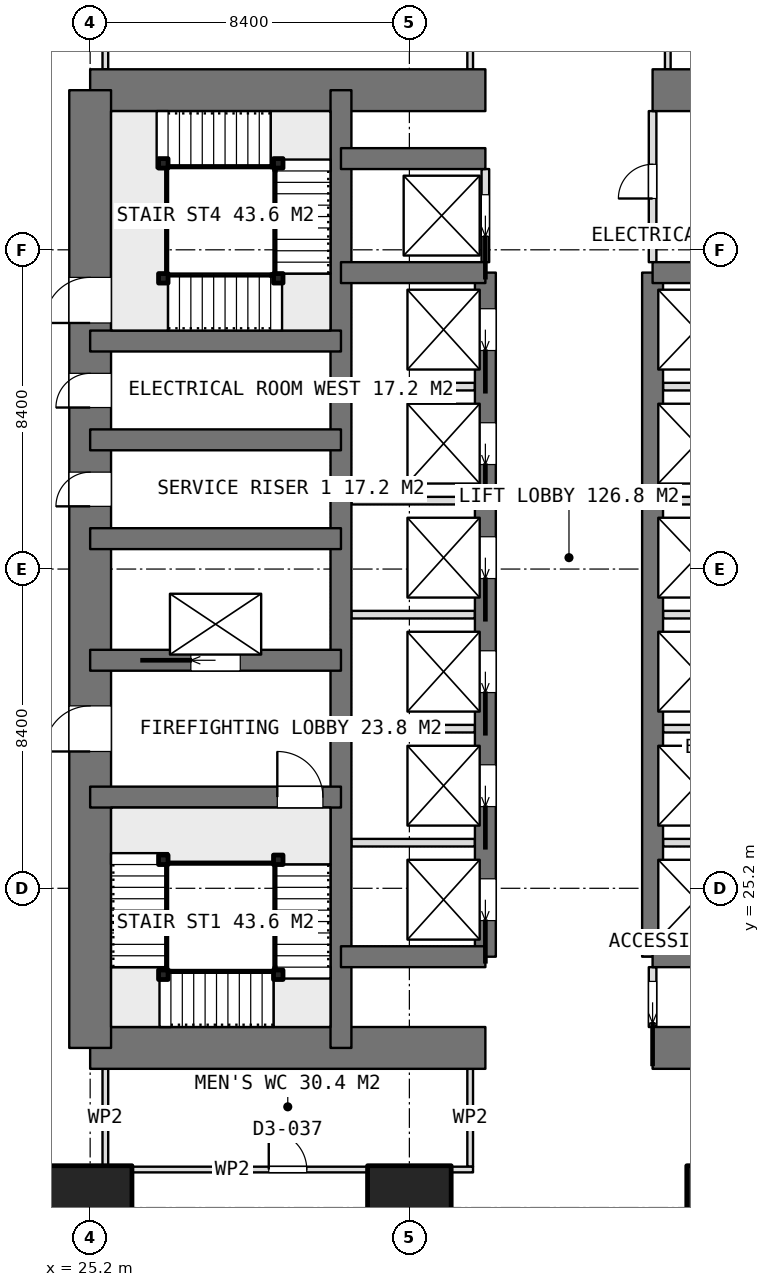
"""IFC4 building model, lengths in metres.
Left out: names, types, materials, properties, quantities, classifications, styles, units other than length and angle.
Written with IfcOpenShell. Run it as: python <this file> out.ifc"""

import sys

from ifc_helpers import new_model, si_unit, direction, frame, frame_2d, origin, origin_2d, place, context, subcontext, project, spatial, rectangle, extrude, element, fill, save


model = new_model("IFC4")
c1 = context("Model", 3, precision=1e-05, world=origin(), true_north=direction((0.0, 1.0)))
c2 = subcontext(c1, "Body", "Model", "MODEL_VIEW")
j1 = project(units=[si_unit("LENGTHUNIT", "METRE"), si_unit("PLANEANGLEUNIT", "RADIAN")], contexts=[c1])
p1 = place(None, origin())
s1 = spatial("IfcSite", under=j1, at=p1, CompositionType="ELEMENT")
p2 = place(p1, origin())
s2 = spatial("IfcBuilding", under=s1, at=p2, CompositionType="ELEMENT")
p3 = place(p2, frame((0.0, 0.0, 32.9)))
s3 = spatial("IfcBuildingStorey", under=s2, at=p3, CompositionType="ELEMENT", Elevation=32.9)
p4 = place(p3, frame((25.2, 21.0, 0.0), z_axis=(0.0, 0.0, 1.0), x_axis=(1.0, 0.0, 0.0)))
e1 = element("IfcWall", 1, at=p4, inside=s3, PredefinedType="SHEAR", context=c2, shape_type="SweptSolid", body=[
    extrude(rectangle(XDim=10.4, YDim=1.1, at=frame_2d((5.2, 0.0))), origin(), (0.0, 0.0, 1.0), 3.75),
])
p5 = place(p3, frame((40.0, 21.0, 0.0), z_axis=(0.0, 0.0, 1.0), x_axis=(1.0, 0.0, 0.0)))
e2 = element("IfcWall", 2, at=p5, inside=s3, PredefinedType="SHEAR", context=c2, shape_type="SweptSolid", body=[
    extrude(rectangle(XDim=10.4, YDim=1.1, at=frame_2d((5.2, 0.0))), origin(), (0.0, 0.0, 1.0), 3.75),
])
p6 = place(p3, frame((25.2, 46.2, 0.0), z_axis=(0.0, 0.0, 1.0), x_axis=(1.0, 0.0, 0.0)))
e3 = element("IfcWall", 3, at=p6, inside=s3, PredefinedType="SHEAR", context=c2, shape_type="SweptSolid", body=[
    extrude(rectangle(XDim=10.4, YDim=1.1, at=frame_2d((5.2, 0.0))), origin(), (0.0, 0.0, 1.0), 3.75),
])
p7 = place(p3, frame((40.0, 46.2, 0.0), z_axis=(0.0, 0.0, 1.0), x_axis=(1.0, 0.0, 0.0)))
e4 = element("IfcWall", 4, at=p7, inside=s3, PredefinedType="SHEAR", context=c2, shape_type="SweptSolid", body=[
    extrude(rectangle(XDim=10.4, YDim=1.1, at=frame_2d((5.2, 0.0))), origin(), (0.0, 0.0, 1.0), 3.75),
])
p8 = place(p3, frame((25.2, 21.0, 0.0), z_axis=(0.0, 0.0, 1.0), x_axis=(0.0, 1.0, 0.0)))
e5 = element("IfcWall", 5, at=p8, inside=s3, PredefinedType="SHEAR", context=c2, shape_type="SweptSolid", body=[
    extrude(rectangle(XDim=25.2, YDim=1.1, at=frame_2d((12.6, 0.0))), origin(), (0.0, 0.0, 1.0), 3.75),
])
p9 = place(p8, frame((7.8, 0.0, 0.0)))
e6 = element("IfcOpeningElement", 6, at=p9, cuts=e5, PredefinedType="OPENING", context=c2, shape_type="SweptSolid", body=[
    extrude(rectangle(XDim=1.2, YDim=2.1, at=frame_2d((0.6, 1.05))), frame((0.0, 0.56, 0.0), z_axis=(0.0, -1.0, 0.0), x_axis=(1.0, 0.0, 0.0)), (0.0, 0.0, 1.0), 1.12),
])
p10 = place(p8, frame((14.25, 0.0, 0.0)))
e7 = element("IfcOpeningElement", 7, at=p10, cuts=e5, PredefinedType="OPENING", context=c2, shape_type="SweptSolid", body=[
    extrude(rectangle(XDim=0.9, YDim=2.1, at=frame_2d((0.45, 1.05))), frame((0.0, 0.56, 0.0), z_axis=(0.0, -1.0, 0.0), x_axis=(1.0, 0.0, 0.0)), (0.0, 0.0, 1.0), 1.12),
])
p11 = place(p8, frame((16.85, 0.0, 0.0)))
e8 = element("IfcOpeningElement", 8, at=p11, cuts=e5, PredefinedType="OPENING", context=c2, shape_type="SweptSolid", body=[
    extrude(rectangle(XDim=0.9, YDim=2.1, at=frame_2d((0.45, 1.05))), frame((0.0, 0.56, 0.0), z_axis=(0.0, -1.0, 0.0), x_axis=(1.0, 0.0, 0.0)), (0.0, 0.0, 1.0), 1.12),
])
p12 = place(p8, frame((19.075, 0.0, 0.0)))
e9 = element("IfcOpeningElement", 9, at=p12, cuts=e5, PredefinedType="OPENING", context=c2, shape_type="SweptSolid", body=[
    extrude(rectangle(XDim=1.2, YDim=2.1, at=frame_2d((0.6, 1.05))), frame((0.0, 0.56, 0.0), z_axis=(0.0, -1.0, 0.0), x_axis=(1.0, 0.0, 0.0)), (0.0, 0.0, 1.0), 1.12),
])
p13 = place(p3, frame((31.8, 21.0, 0.0), z_axis=(0.0, 0.0, 1.0), x_axis=(0.0, 1.0, 0.0)))
e10 = element("IfcWall", 10, at=p13, inside=s3, PredefinedType="SHEAR", context=c2, shape_type="SweptSolid", body=[
    extrude(rectangle(XDim=25.2, YDim=0.55, at=frame_2d((12.6, 0.0))), origin(), (0.0, 0.0, 1.0), 3.75),
])
p14 = place(p3, frame((35.6, 23.4, 0.0), z_axis=(0.0, 0.0, 1.0), x_axis=(0.0, 1.0, 0.0)))
e11 = element("IfcWall", 11, at=p14, inside=s3, PredefinedType="SHEAR", context=c2, shape_type="SweptSolid", body=[
    extrude(rectangle(XDim=18.0, YDim=0.55, at=frame_2d((9.0, 0.0))), origin(), (0.0, 0.0, 1.0), 3.75),
])
p15 = place(p14, frame((0.95, 0.0, 0.0)))
e12 = element("IfcOpeningElement", 12, at=p15, cuts=e11, PredefinedType="OPENING", context=c2, shape_type="SweptSolid", body=[
    extrude(rectangle(XDim=1.1, YDim=2.1, at=frame_2d((0.55, 1.05))), frame((0.0, 0.285, 0.0), z_axis=(0.0, -1.0, 0.0), x_axis=(1.0, 0.0, 0.0)), (0.0, 0.0, 1.0), 0.57),
])
p16 = place(p14, frame((3.95, 0.0, 0.0)))
e13 = element("IfcOpeningElement", 13, at=p16, cuts=e11, PredefinedType="OPENING", context=c2, shape_type="SweptSolid", body=[
    extrude(rectangle(XDim=1.1, YDim=2.1, at=frame_2d((0.55, 1.05))), frame((0.0, 0.285, 0.0), z_axis=(0.0, -1.0, 0.0), x_axis=(1.0, 0.0, 0.0)), (0.0, 0.0, 1.0), 0.57),
])
p17 = place(p14, frame((6.95, 0.0, 0.0)))
e14 = element("IfcOpeningElement", 14, at=p17, cuts=e11, PredefinedType="OPENING", context=c2, shape_type="SweptSolid", body=[
    extrude(rectangle(XDim=1.1, YDim=2.1, at=frame_2d((0.55, 1.05))), frame((0.0, 0.285, 0.0), z_axis=(0.0, -1.0, 0.0), x_axis=(1.0, 0.0, 0.0)), (0.0, 0.0, 1.0), 0.57),
])
p18 = place(p14, frame((9.95, 0.0, 0.0)))
e15 = element("IfcOpeningElement", 15, at=p18, cuts=e11, PredefinedType="OPENING", context=c2, shape_type="SweptSolid", body=[
    extrude(rectangle(XDim=1.1, YDim=2.1, at=frame_2d((0.55, 1.05))), frame((0.0, 0.285, 0.0), z_axis=(0.0, -1.0, 0.0), x_axis=(1.0, 0.0, 0.0)), (0.0, 0.0, 1.0), 0.57),
])
p19 = place(p14, frame((12.95, 0.0, 0.0)))
e16 = element("IfcOpeningElement", 16, at=p19, cuts=e11, PredefinedType="OPENING", context=c2, shape_type="SweptSolid", body=[
    extrude(rectangle(XDim=1.1, YDim=2.1, at=frame_2d((0.55, 1.05))), frame((0.0, 0.285, 0.0), z_axis=(0.0, -1.0, 0.0), x_axis=(1.0, 0.0, 0.0)), (0.0, 0.0, 1.0), 0.57),
])
p20 = place(p14, frame((15.95, 0.0, 0.0)))
e17 = element("IfcOpeningElement", 17, at=p20, cuts=e11, PredefinedType="OPENING", context=c2, shape_type="SweptSolid", body=[
    extrude(rectangle(XDim=1.1, YDim=2.1, at=frame_2d((0.55, 1.05))), frame((0.0, 0.285, 0.0), z_axis=(0.0, -1.0, 0.0), x_axis=(1.0, 0.0, 0.0)), (0.0, 0.0, 1.0), 0.57),
])
p21 = place(p3, frame((40.0, 23.4, 0.0), z_axis=(0.0, 0.0, 1.0), x_axis=(0.0, 1.0, 0.0)))
e18 = element("IfcWall", 18, at=p21, inside=s3, PredefinedType="SHEAR", context=c2, shape_type="SweptSolid", body=[
    extrude(rectangle(XDim=18.0, YDim=0.55, at=frame_2d((9.0, 0.0))), origin(), (0.0, 0.0, 1.0), 3.75),
])
for number, where, z_axis, x_axis in (
    (19, (31.8, 23.4, 0.0), (0.0, 0.0, 1.0), (1.0, 0.0, 0.0)),
    (20, (31.8, 41.4, 0.0), (0.0, 0.0, 1.0), (1.0, 0.0, 0.0)),
    (21, (31.8, 44.4, 0.0), (0.0, 0.0, 1.0), (1.0, 0.0, 0.0)),
    (22, (40.0, 23.4, 0.0), (0.0, 0.0, 1.0), (1.0, 0.0, 0.0)),
    (23, (40.0, 41.4, 0.0), (0.0, 0.0, 1.0), (1.0, 0.0, 0.0)),
):
    element("IfcWall", number, at=place(p3, frame(where, z_axis=z_axis, x_axis=x_axis)), inside=s3, PredefinedType="SHEAR", context=c2, shape_type="SweptSolid", body=[
        extrude(rectangle(XDim=3.8, YDim=0.55, at=frame_2d((1.9, 0.0))), origin(), (0.0, 0.0, 1.0), 3.75),
    ])
p22 = place(p3, frame((25.2, 27.6, 0.0), z_axis=(0.0, 0.0, 1.0), x_axis=(1.0, 0.0, 0.0)))
e24 = element("IfcWall", 24, at=p22, inside=s3, PredefinedType="SHEAR", context=c2, shape_type="SweptSolid", body=[
    extrude(rectangle(XDim=6.6, YDim=0.55, at=frame_2d((3.3, 0.0))), origin(), (0.0, 0.0, 1.0), 3.75),
])
p23 = place(p22, frame((4.925, 0.0, 0.0)))
e25 = element("IfcOpeningElement", 25, at=p23, cuts=e24, PredefinedType="OPENING", context=c2, shape_type="SweptSolid", body=[
    extrude(rectangle(XDim=1.2, YDim=2.1, at=frame_2d((0.6, 1.05))), frame((0.0, 0.285, 0.0), z_axis=(0.0, -1.0, 0.0), x_axis=(1.0, 0.0, 0.0)), (0.0, 0.0, 1.0), 0.57),
])
p24 = place(p3, frame((25.2, 31.2, 0.0), z_axis=(0.0, 0.0, 1.0), x_axis=(1.0, 0.0, 0.0)))
e26 = element("IfcWall", 26, at=p24, inside=s3, PredefinedType="SHEAR", context=c2, shape_type="SweptSolid", body=[
    extrude(rectangle(XDim=6.6, YDim=0.55, at=frame_2d((3.3, 0.0))), origin(), (0.0, 0.0, 1.0), 3.75),
])
p25 = place(p24, frame((2.65, 0.0, 0.0)))
e27 = element("IfcOpeningElement", 27, at=p25, cuts=e26, PredefinedType="OPENING", context=c2, shape_type="SweptSolid", body=[
    extrude(rectangle(XDim=1.3, YDim=2.1, at=frame_2d((0.65, 1.05))), frame((0.0, 0.285, 0.0), z_axis=(0.0, -1.0, 0.0), x_axis=(1.0, 0.0, 0.0)), (0.0, 0.0, 1.0), 0.57),
])
for number, where, z_axis, x_axis in (
    (28, (25.2, 34.4, 0.0), (0.0, 0.0, 1.0), (1.0, 0.0, 0.0)),
    (29, (25.2, 37.0, 0.0), (0.0, 0.0, 1.0), (1.0, 0.0, 0.0)),
    (30, (25.2, 39.6, 0.0), (0.0, 0.0, 1.0), (1.0, 0.0, 0.0)),
):
    element("IfcWall", number, at=place(p3, frame(where, z_axis=z_axis, x_axis=x_axis)), inside=s3, PredefinedType="SHEAR", context=c2, shape_type="SweptSolid", body=[
        extrude(rectangle(XDim=6.6, YDim=0.55, at=frame_2d((3.3, 0.0))), origin(), (0.0, 0.0, 1.0), 3.75),
    ])
for number, where, z_axis, x_axis in (
    (31, (25.2, 16.8, 0.0), (0.0, 0.0, 1.0), (1.0, 0.0, 0.0)),
    (32, (33.6, 16.8, 0.0), (0.0, 0.0, 1.0), (1.0, 0.0, 0.0)),
    (33, (42.0, 16.8, 0.0), (0.0, 0.0, 1.0), (1.0, 0.0, 0.0)),
):
    element("IfcColumn", number, at=place(p3, frame(where, z_axis=z_axis, x_axis=x_axis)), inside=s3, PredefinedType="COLUMN", context=c2, shape_type="SweptSolid", body=[
        extrude(rectangle(XDim=2.2, YDim=2.2, at=origin_2d()), origin(), (0.0, 0.0, 1.0), 3.75),
    ])
for number, where, z_axis, x_axis in (
    (34, (32.075, 26.4, 0.0), (0.0, 0.0, 1.0), (1.0, 0.0, 0.0)),
    (35, (32.075, 29.4, 0.0), (0.0, 0.0, 1.0), (1.0, 0.0, 0.0)),
    (36, (32.075, 32.4, 0.0), (0.0, 0.0, 1.0), (1.0, 0.0, 0.0)),
    (37, (32.075, 35.4, 0.0), (0.0, 0.0, 1.0), (1.0, 0.0, 0.0)),
    (38, (32.075, 38.4, 0.0), (0.0, 0.0, 1.0), (1.0, 0.0, 0.0)),
    (39, (40.275, 26.4, 0.0), (0.0, 0.0, 1.0), (1.0, 0.0, 0.0)),
    (40, (40.275, 29.4, 0.0), (0.0, 0.0, 1.0), (1.0, 0.0, 0.0)),
    (41, (40.275, 32.4, 0.0), (0.0, 0.0, 1.0), (1.0, 0.0, 0.0)),
    (42, (40.275, 35.4, 0.0), (0.0, 0.0, 1.0), (1.0, 0.0, 0.0)),
    (43, (40.275, 38.4, 0.0), (0.0, 0.0, 1.0), (1.0, 0.0, 0.0)),
):
    element("IfcWall", number, at=place(p3, frame(where, z_axis=z_axis, x_axis=x_axis)), inside=s3, PredefinedType="PARTITIONING", context=c2, shape_type="SweptSolid", body=[
        extrude(rectangle(XDim=3.25, YDim=0.2, at=frame_2d((1.625, 0.0))), origin(), (0.0, 0.0, 1.0), 3.5),
    ])
p26 = place(p3, frame((40.0, 21.55, 0.0), z_axis=(0.0, 0.0, 1.0), x_axis=(0.0, 1.0, 0.0)))
e44 = element("IfcWall", 44, at=p26, inside=s3, PredefinedType="PARTITIONING", context=c2, shape_type="SweptSolid", body=[
    extrude(rectangle(XDim=1.575, YDim=0.2, at=frame_2d((0.788, 0.0))), origin(), (0.0, 0.0, 1.0), 3.5),
])
p27 = place(p26, frame((0.1, 0.0, 0.0)))
e45 = element("IfcOpeningElement", 45, at=p27, cuts=e44, PredefinedType="OPENING", context=c2, shape_type="SweptSolid", body=[
    extrude(rectangle(XDim=1.1, YDim=2.1, at=frame_2d((0.55, 1.05))), frame((0.0, 0.11, 0.0), z_axis=(0.0, -1.0, 0.0), x_axis=(1.0, 0.0, 0.0)), (0.0, 0.0, 1.0), 0.22),
])
p28 = place(p3, frame((40.0, 41.675, 0.0), z_axis=(0.0, 0.0, 1.0), x_axis=(0.0, 1.0, 0.0)))
e46 = element("IfcWall", 46, at=p28, inside=s3, PredefinedType="PARTITIONING", context=c2, shape_type="SweptSolid", body=[
    extrude(rectangle(XDim=3.975, YDim=0.2, at=frame_2d((1.987, 0.0))), origin(), (0.0, 0.0, 1.0), 3.5),
])
p29 = place(p28, frame((1.675, 0.0, 0.0)))
e47 = element("IfcOpeningElement", 47, at=p29, cuts=e46, PredefinedType="OPENING", context=c2, shape_type="SweptSolid", body=[
    extrude(rectangle(XDim=0.9, YDim=2.1, at=frame_2d((0.45, 1.05))), frame((0.0, 0.11, 0.0), z_axis=(0.0, -1.0, 0.0), x_axis=(1.0, 0.0, 0.0)), (0.0, 0.0, 1.0), 0.22),
])
p30 = place(p3, frame((35.6, 41.675, 0.0), z_axis=(0.0, 0.0, 1.0), x_axis=(0.0, 1.0, 0.0)))
e48 = element("IfcWall", 48, at=p30, inside=s3, PredefinedType="PARTITIONING", context=c2, shape_type="SweptSolid", body=[
    extrude(rectangle(XDim=2.45, YDim=0.2, at=frame_2d((1.225, 0.0))), origin(), (0.0, 0.0, 1.0), 3.5),
])
p31 = place(p30, frame((0.675, 0.0, 0.0)))
e49 = element("IfcOpeningElement", 49, at=p31, cuts=e48, PredefinedType="OPENING", context=c2, shape_type="SweptSolid", body=[
    extrude(rectangle(XDim=1.1, YDim=2.1, at=frame_2d((0.55, 1.05))), frame((0.0, 0.11, 0.0), z_axis=(0.0, -1.0, 0.0), x_axis=(1.0, 0.0, 0.0)), (0.0, 0.0, 1.0), 0.22),
])
for number, where, z_axis, x_axis in (
    (50, (40.4, 46.75, 0.0), (0.0, 0.0, 1.0), (0.0, 1.0, 0.0)),
    (51, (25.6, 46.75, 0.0), (0.0, 0.0, 1.0), (0.0, 1.0, 0.0)),
    (52, (35.2, 46.75, 0.0), (0.0, 0.0, 1.0), (0.0, 1.0, 0.0)),
):
    element("IfcWall", number, at=place(p3, frame(where, z_axis=z_axis, x_axis=x_axis)), inside=s3, PredefinedType="PARTITIONING", context=c2, shape_type="SweptSolid", body=[
        extrude(rectangle(XDim=2.575, YDim=0.15, at=frame_2d((1.288, 0.0))), origin(), (0.0, 0.0, 1.0), 3.5),
    ])
p32 = place(p3, frame((25.525, 17.8, 0.0), z_axis=(0.0, 0.0, 1.0), x_axis=(1.0, 0.0, 0.0)))
e53 = element("IfcWall", 53, at=p32, inside=s3, PredefinedType="PARTITIONING", context=c2, shape_type="SweptSolid", body=[
    extrude(rectangle(XDim=9.75, YDim=0.15, at=frame_2d((4.875, 0.0))), origin(), (0.0, 0.0, 1.0), 3.5),
])
p33 = place(p32, frame((4.375, 0.0, 0.0)))
e54 = element("IfcOpeningElement", 54, at=p33, cuts=e53, PredefinedType="OPENING", context=c2, shape_type="SweptSolid", body=[
    extrude(rectangle(XDim=1.0, YDim=2.1, at=frame_2d((0.5, 1.05))), frame((0.0, 0.085, 0.0), z_axis=(0.0, -1.0, 0.0), x_axis=(1.0, 0.0, 0.0)), (0.0, 0.0, 1.0), 0.17),
])
for number, where, z_axis, x_axis in (
    (55, (25.6, 17.875, 0.0), (0.0, 0.0, 1.0), (0.0, 1.0, 0.0)),
    (56, (35.2, 17.875, 0.0), (0.0, 0.0, 1.0), (0.0, 1.0, 0.0)),
):
    element("IfcWall", number, at=place(p3, frame(where, z_axis=z_axis, x_axis=x_axis)), inside=s3, PredefinedType="PARTITIONING", context=c2, shape_type="SweptSolid", body=[
        extrude(rectangle(XDim=2.575, YDim=0.15, at=frame_2d((1.288, 0.0))), origin(), (0.0, 0.0, 1.0), 3.5),
    ])
for number, where, z_axis, x_axis in (
    (57, (30.15, 25.95, 0.0), (0.0, 0.0, 1.0), (1.0, 0.0, 0.0)),
    (58, (30.15, 22.925, 0.0), (0.0, 0.0, 1.0), (1.0, 0.0, 0.0)),
    (59, (27.125, 22.925, 0.0), (0.0, 0.0, 1.0), (1.0, 0.0, 0.0)),
    (60, (27.125, 25.95, 0.0), (0.0, 0.0, 1.0), (1.0, 0.0, 0.0)),
    (61, (27.125, 41.25, 0.0), (0.0, 0.0, 1.0), (1.0, 0.0, 0.0)),
    (62, (30.15, 41.25, 0.0), (0.0, 0.0, 1.0), (1.0, 0.0, 0.0)),
    (63, (30.15, 44.275, 0.0), (0.0, 0.0, 1.0), (1.0, 0.0, 0.0)),
    (64, (27.125, 44.275, 0.0), (0.0, 0.0, 1.0), (1.0, 0.0, 0.0)),
):
    element("IfcColumn", number, at=place(p3, frame(where, z_axis=z_axis, x_axis=x_axis)), inside=s3, PredefinedType="COLUMN", context=c2, shape_type="SweptSolid", body=[
        extrude(rectangle(XDim=0.25, YDim=0.25, at=origin_2d()), origin(), (0.0, 0.0, 1.0), 3.75),
    ])
p34 = place(p9, origin())
e65 = element("IfcDoor", 65, at=p34, inside=s3, OperationType="SINGLE_SWING_LEFT", PredefinedType="DOOR", context=c2, shape_type="SweptSolid", body=[
    extrude(rectangle(XDim=1.2, YDim=2.1, at=frame_2d((0.6, 1.05))), frame((0.0, 0.025, 0.0), z_axis=(0.0, -1.0, 0.0), x_axis=(1.0, 0.0, 0.0)), (0.0, 0.0, 1.0), 0.05),
])
fill(e6, e65)
p35 = place(p10, origin())
e66 = element("IfcDoor", 66, at=p35, inside=s3, OperationType="SINGLE_SWING_LEFT", PredefinedType="DOOR", context=c2, shape_type="SweptSolid", body=[
    extrude(rectangle(XDim=0.9, YDim=2.1, at=frame_2d((0.45, 1.05))), frame((0.0, 0.025, 0.0), z_axis=(0.0, -1.0, 0.0), x_axis=(1.0, 0.0, 0.0)), (0.0, 0.0, 1.0), 0.05),
])
fill(e7, e66)
p36 = place(p11, origin())
e67 = element("IfcDoor", 67, at=p36, inside=s3, OperationType="SINGLE_SWING_LEFT", PredefinedType="DOOR", context=c2, shape_type="SweptSolid", body=[
    extrude(rectangle(XDim=0.9, YDim=2.1, at=frame_2d((0.45, 1.05))), frame((0.0, 0.025, 0.0), z_axis=(0.0, -1.0, 0.0), x_axis=(1.0, 0.0, 0.0)), (0.0, 0.0, 1.0), 0.05),
])
fill(e8, e67)
p37 = place(p27, origin())
e68 = element("IfcDoor", 68, at=p37, inside=s3, OperationType="SLIDING_TO_LEFT", PredefinedType="DOOR", context=c2, shape_type="SweptSolid", body=[
    extrude(rectangle(XDim=1.1, YDim=2.1, at=frame_2d((0.55, 1.05))), frame((0.0, 0.025, 0.0), z_axis=(0.0, -1.0, 0.0), x_axis=(1.0, 0.0, 0.0)), (0.0, 0.0, 1.0), 0.05),
])
fill(e45, e68)
p38 = place(p29, origin())
e69 = element("IfcDoor", 69, at=p38, inside=s3, OperationType="SINGLE_SWING_LEFT", PredefinedType="DOOR", context=c2, shape_type="SweptSolid", body=[
    extrude(rectangle(XDim=0.9, YDim=2.1, at=frame_2d((0.45, 1.05))), frame((0.0, 0.025, 0.0), z_axis=(0.0, -1.0, 0.0), x_axis=(1.0, 0.0, 0.0)), (0.0, 0.0, 1.0), 0.05),
])
fill(e47, e69)
p39 = place(p15, origin())
e70 = element("IfcDoor", 70, at=p39, inside=s3, OperationType="SLIDING_TO_LEFT", PredefinedType="USERDEFINED", context=c2, shape_type="SweptSolid", body=[
    extrude(rectangle(XDim=1.1, YDim=2.1, at=frame_2d((0.55, 1.05))), frame((0.0, 0.025, 0.0), z_axis=(0.0, -1.0, 0.0), x_axis=(1.0, 0.0, 0.0)), (0.0, 0.0, 1.0), 0.05),
])
fill(e12, e70)
p40 = place(p16, origin())
e71 = element("IfcDoor", 71, at=p40, inside=s3, OperationType="SLIDING_TO_LEFT", PredefinedType="USERDEFINED", context=c2, shape_type="SweptSolid", body=[
    extrude(rectangle(XDim=1.1, YDim=2.1, at=frame_2d((0.55, 1.05))), frame((0.0, 0.025, 0.0), z_axis=(0.0, -1.0, 0.0), x_axis=(1.0, 0.0, 0.0)), (0.0, 0.0, 1.0), 0.05),
])
fill(e13, e71)
p41 = place(p17, origin())
e72 = element("IfcDoor", 72, at=p41, inside=s3, OperationType="SLIDING_TO_LEFT", PredefinedType="USERDEFINED", context=c2, shape_type="SweptSolid", body=[
    extrude(rectangle(XDim=1.1, YDim=2.1, at=frame_2d((0.55, 1.05))), frame((0.0, 0.025, 0.0), z_axis=(0.0, -1.0, 0.0), x_axis=(1.0, 0.0, 0.0)), (0.0, 0.0, 1.0), 0.05),
])
fill(e14, e72)
p42 = place(p18, origin())
e73 = element("IfcDoor", 73, at=p42, inside=s3, OperationType="SLIDING_TO_LEFT", PredefinedType="USERDEFINED", context=c2, shape_type="SweptSolid", body=[
    extrude(rectangle(XDim=1.1, YDim=2.1, at=frame_2d((0.55, 1.05))), frame((0.0, 0.025, 0.0), z_axis=(0.0, -1.0, 0.0), x_axis=(1.0, 0.0, 0.0)), (0.0, 0.0, 1.0), 0.05),
])
fill(e15, e73)
p43 = place(p19, origin())
e74 = element("IfcDoor", 74, at=p43, inside=s3, OperationType="SLIDING_TO_LEFT", PredefinedType="USERDEFINED", context=c2, shape_type="SweptSolid", body=[
    extrude(rectangle(XDim=1.1, YDim=2.1, at=frame_2d((0.55, 1.05))), frame((0.0, 0.025, 0.0), z_axis=(0.0, -1.0, 0.0), x_axis=(1.0, 0.0, 0.0)), (0.0, 0.0, 1.0), 0.05),
])
fill(e16, e74)
p44 = place(p20, origin())
e75 = element("IfcDoor", 75, at=p44, inside=s3, OperationType="SLIDING_TO_LEFT", PredefinedType="USERDEFINED", context=c2, shape_type="SweptSolid", body=[
    extrude(rectangle(XDim=1.1, YDim=2.1, at=frame_2d((0.55, 1.05))), frame((0.0, 0.025, 0.0), z_axis=(0.0, -1.0, 0.0), x_axis=(1.0, 0.0, 0.0)), (0.0, 0.0, 1.0), 0.05),
])
fill(e17, e75)
p45 = place(p25, origin())
e76 = element("IfcDoor", 76, at=p45, inside=s3, OperationType="SLIDING_TO_LEFT", PredefinedType="USERDEFINED", context=c2, shape_type="SweptSolid", body=[
    extrude(rectangle(XDim=1.3, YDim=2.1, at=frame_2d((0.65, 1.05))), frame((0.0, 0.025, 0.0), z_axis=(0.0, -1.0, 0.0), x_axis=(1.0, 0.0, 0.0)), (0.0, 0.0, 1.0), 0.05),
])
fill(e27, e76)
p46 = place(p31, origin())
e77 = element("IfcDoor", 77, at=p46, inside=s3, OperationType="SLIDING_TO_LEFT", PredefinedType="USERDEFINED", context=c2, shape_type="SweptSolid", body=[
    extrude(rectangle(XDim=1.1, YDim=2.1, at=frame_2d((0.55, 1.05))), frame((0.0, 0.025, 0.0), z_axis=(0.0, -1.0, 0.0), x_axis=(1.0, 0.0, 0.0)), (0.0, 0.0, 1.0), 0.05),
])
fill(e49, e77)
p47 = place(p33, origin())
e78 = element("IfcDoor", 78, at=p47, inside=s3, OperationType="SINGLE_SWING_LEFT", PredefinedType="DOOR", context=c2, shape_type="SweptSolid", body=[
    extrude(rectangle(XDim=1.0, YDim=2.1, at=frame_2d((0.5, 1.05))), frame((0.0, 0.025, 0.0), z_axis=(0.0, -1.0, 0.0), x_axis=(1.0, 0.0, 0.0)), (0.0, 0.0, 1.0), 0.05),
])
fill(e54, e78)
p48 = place(p23, origin())
e79 = element("IfcDoor", 79, at=p48, inside=s3, OperationType="SINGLE_SWING_RIGHT", PredefinedType="DOOR", context=c2, shape_type="SweptSolid", body=[
    extrude(rectangle(XDim=1.2, YDim=2.1, at=frame_2d((0.6, 1.05))), frame((0.0, 0.025, 0.0), z_axis=(0.0, -1.0, 0.0), x_axis=(1.0, 0.0, 0.0)), (0.0, 0.0, 1.0), 0.05),
])
fill(e25, e79)
p49 = place(p12, origin())
e80 = element("IfcDoor", 80, at=p49, inside=s3, OperationType="SINGLE_SWING_RIGHT", PredefinedType="DOOR", context=c2, shape_type="SweptSolid", body=[
    extrude(rectangle(XDim=1.2, YDim=2.1, at=frame_2d((0.6, 1.05))), frame((0.0, 0.025, 0.0), z_axis=(0.0, -1.0, 0.0), x_axis=(1.0, 0.0, 0.0)), (0.0, 0.0, 1.0), 0.05),
])
fill(e9, e80)
save(model, sys.argv[1])
